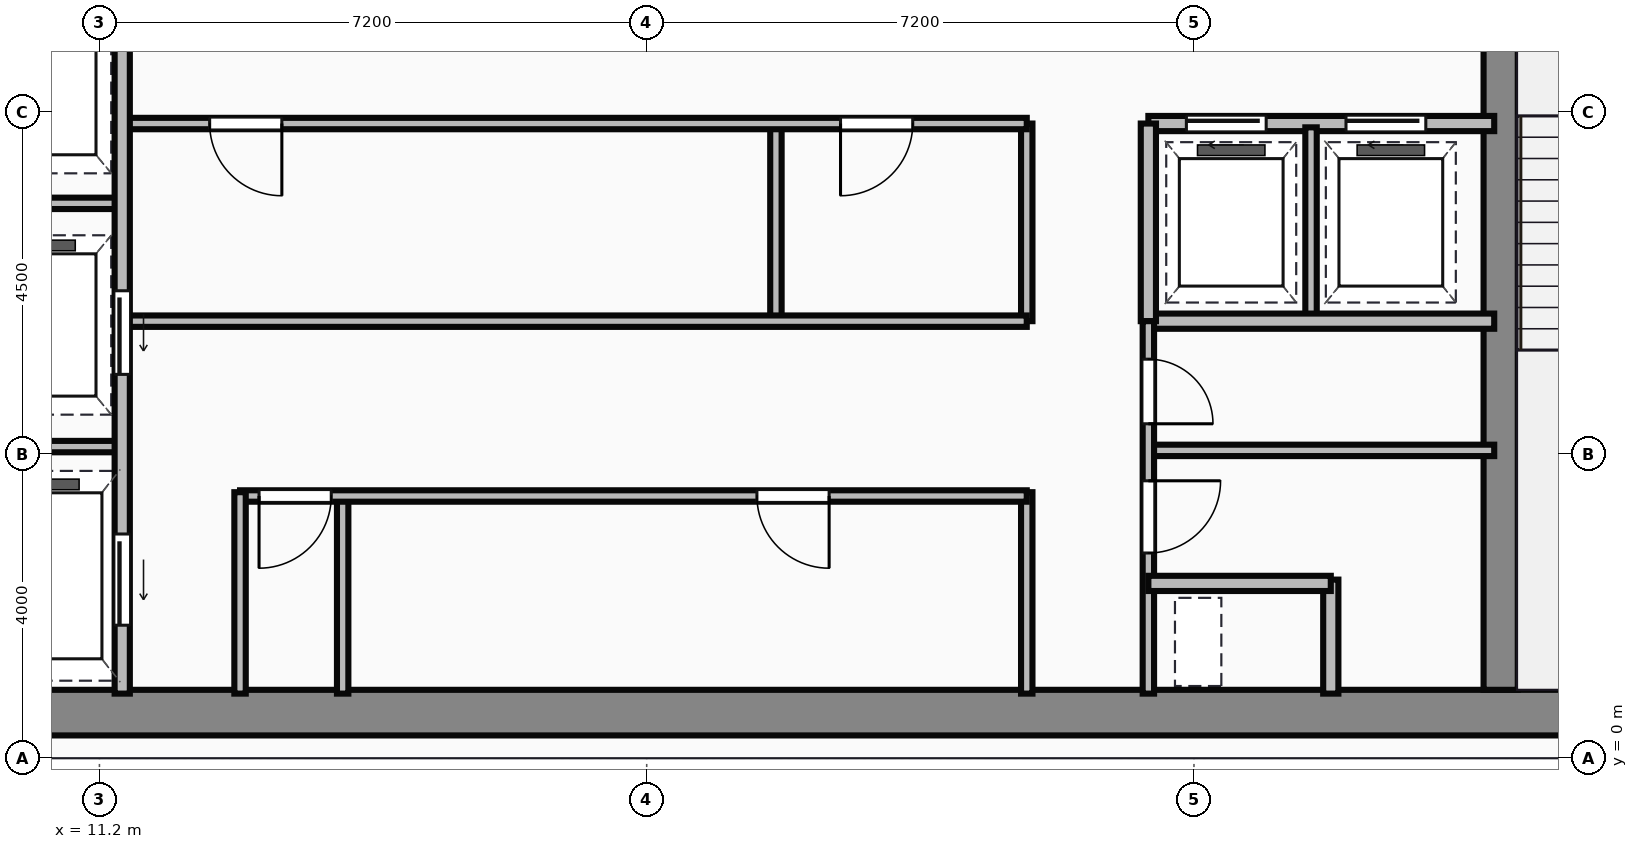
"""IFC4 building model, lengths in metres.
Left out: names, types, materials, properties, quantities, classifications, styles, units other than length and angle.
Written with IfcOpenShell. Run it as: python <this file> out.ifc"""

import sys

from ifc_helpers import new_model, si_unit, direction, frame, frame_2d, origin, place, context, subcontext, project, spatial, rectangle, extrude, source, transform, mapped, element, fill, save


model = new_model("IFC4")
c1 = context("Model", 3, precision=1e-05, world=origin(), true_north=direction((0.0, 1.0)))
c2 = subcontext(c1, "Body", "Model", "MODEL_VIEW")
j1 = project(units=[si_unit("LENGTHUNIT", "METRE"), si_unit("PLANEANGLEUNIT", "RADIAN")], contexts=[c1])
p1 = place(None, origin())
s1 = spatial("IfcSite", under=j1, at=p1, CompositionType="ELEMENT")
p2 = place(p1, origin())
s2 = spatial("IfcBuilding", under=s1, at=p2, CompositionType="ELEMENT")
p3 = place(p2, frame((0.0, 0.0, 288.0)))
s3 = spatial("IfcBuildingStorey", under=s2, at=p3, CompositionType="ELEMENT", Elevation=288.0)
m1 = source(origin(), c2, "Body", "SweptSolid", [
    extrude(rectangle(XDim=29.5, YDim=0.6, at=frame_2d((14.75, 0.0))), origin(), (0.0, 0.0, 1.0), 4.25),
])
p4 = place(p3, frame((4.5, 0.6, 0.0), z_axis=(0.0, 0.0, 1.0), x_axis=(1.0, 0.0, 0.0)))
e1 = element("IfcWall", 1, at=p4, inside=s3, PredefinedType="SHEAR", context=c2, shape_type="MappedRepresentation", body=[
    mapped(m1, transform((0.0, 0.0, 0.0))),
])
m2 = source(origin(), c2, "Body", "SweptSolid", [
    extrude(rectangle(XDim=12.5, YDim=0.45, at=frame_2d((6.25, 0.0))), origin(), (0.0, 0.0, 1.0), 4.25),
])
p5 = place(p3, frame((29.635, 0.9, 0.0), z_axis=(0.0, 0.0, 1.0), x_axis=(0.0, 1.0, 0.0)))
e2 = element("IfcWall", 2, at=p5, inside=s3, PredefinedType="SHEAR", context=c2, shape_type="MappedRepresentation", body=[
    mapped(m2, transform((0.0, 0.0, 0.0))),
])
m3 = source(origin(), c2, "Body", "SweptSolid", [
    extrude(rectangle(XDim=9.6, YDim=0.2, at=frame_2d((4.8, 0.0))), origin(), (0.0, 0.0, 1.0), 3.85),
])
p6 = place(p3, frame((11.5, 0.85, 0.0), z_axis=(0.0, 0.0, 1.0), x_axis=(0.0, 1.0, 0.0)))
e3 = element("IfcWall", 3, at=p6, inside=s3, PredefinedType="PARTITIONING", context=c2, shape_type="MappedRepresentation", body=[
    mapped(m3, transform((0.0, 0.0, 0.0))),
])
p7 = place(p6, frame((4.2, 0.0, 0.0)))
e4 = element("IfcOpeningElement", 4, at=p7, cuts=e3, PredefinedType="OPENING", context=c2, shape_type="SweptSolid", body=[
    extrude(rectangle(XDim=1.1, YDim=2.15, at=frame_2d((0.55, 1.075))), frame((0.0, 0.11, 0.0), z_axis=(0.0, -1.0, 0.0), x_axis=(1.0, 0.0, 0.0)), (0.0, 0.0, 1.0), 0.22),
])
p8 = place(p6, frame((0.9, 0.0, 0.0)))
e5 = element("IfcOpeningElement", 5, at=p8, cuts=e3, PredefinedType="OPENING", context=c2, shape_type="SweptSolid", body=[
    extrude(rectangle(XDim=1.2, YDim=2.15, at=frame_2d((0.6, 1.075))), frame((0.0, 0.11, 0.0), z_axis=(0.0, -1.0, 0.0), x_axis=(1.0, 0.0, 0.0)), (0.0, 0.0, 1.0), 0.22),
])
m4 = source(origin(), c2, "Body", "SweptSolid", [
    extrude(rectangle(XDim=2.4, YDim=0.15, at=frame_2d((1.2, 0.0))), origin(), (0.0, 0.0, 1.0), 3.85),
])
for number, where, z_axis, x_axis in (
    (6, (9.1, 4.1, 0.0), (0.0, 0.0, 1.0), (1.0, 0.0, 0.0)),
    (7, (9.1, 7.3, 0.0), (0.0, 0.0, 1.0), (1.0, 0.0, 0.0)),
):
    element("IfcWall", number, at=place(p3, frame(where, z_axis=z_axis, x_axis=x_axis)), inside=s3, PredefinedType="PARTITIONING", context=c2, shape_type="MappedRepresentation", body=[
        mapped(m4, transform((0.0, 0.0, 0.0))),
    ])
m5 = source(origin(), c2, "Body", "SweptSolid", [
    extrude(rectangle(XDim=2.65, YDim=0.15, at=frame_2d((1.325, 0.0))), origin(), (0.0, 0.0, 1.0), 3.85),
])
p9 = place(p3, frame((13.05, 0.85, 0.0), z_axis=(0.0, 0.0, 1.0), x_axis=(0.0, 1.0, 0.0)))
e8 = element("IfcWall", 8, at=p9, inside=s3, PredefinedType="PARTITIONING", context=c2, shape_type="MappedRepresentation", body=[
    mapped(m5, transform((0.0, 0.0, 0.0))),
])
m6 = source(origin(), c2, "Body", "SweptSolid", [
    extrude(rectangle(XDim=10.35, YDim=0.15, at=frame_2d((5.175, 0.0))), origin(), (0.0, 0.0, 1.0), 3.85),
])
p10 = place(p3, frame((13.05, 3.45, 0.0), z_axis=(0.0, 0.0, 1.0), x_axis=(1.0, 0.0, 0.0)))
e9 = element("IfcWall", 9, at=p10, inside=s3, PredefinedType="PARTITIONING", context=c2, shape_type="MappedRepresentation", body=[
    mapped(m6, transform((0.0, 0.0, 0.0))),
])
p11 = place(p10, frame((0.25, 0.0, 0.0)))
e10 = element("IfcOpeningElement", 10, at=p11, cuts=e9, PredefinedType="OPENING", context=c2, shape_type="SweptSolid", body=[
    extrude(rectangle(XDim=0.95, YDim=2.15, at=frame_2d((0.475, 1.075))), frame((0.0, 0.085, 0.0), z_axis=(0.0, -1.0, 0.0), x_axis=(1.0, 0.0, 0.0)), (0.0, 0.0, 1.0), 0.17),
])
p12 = place(p10, frame((6.8, 0.0, 0.0)))
e11 = element("IfcOpeningElement", 11, at=p12, cuts=e9, PredefinedType="OPENING", context=c2, shape_type="SweptSolid", body=[
    extrude(rectangle(XDim=0.95, YDim=2.15, at=frame_2d((0.475, 1.075))), frame((0.0, 0.085, 0.0), z_axis=(0.0, -1.0, 0.0), x_axis=(1.0, 0.0, 0.0)), (0.0, 0.0, 1.0), 0.17),
])
p13 = place(p3, frame((23.4, 0.85, 0.0), z_axis=(0.0, 0.0, 1.0), x_axis=(0.0, 1.0, 0.0)))
e12 = element("IfcWall", 12, at=p13, inside=s3, PredefinedType="PARTITIONING", context=c2, shape_type="MappedRepresentation", body=[
    mapped(m5, transform((0.0, 0.0, 0.0))),
])
m7 = source(origin(), c2, "Body", "SweptSolid", [
    extrude(rectangle(XDim=2.6, YDim=0.15, at=frame_2d((1.3, 0.0))), origin(), (0.0, 0.0, 1.0), 3.85),
])
p14 = place(p3, frame((14.4, 0.85, 0.0), z_axis=(0.0, 0.0, 1.0), x_axis=(0.0, 1.0, 0.0)))
e13 = element("IfcWall", 13, at=p14, inside=s3, PredefinedType="PARTITIONING", context=c2, shape_type="MappedRepresentation", body=[
    mapped(m7, transform((0.0, 0.0, 0.0))),
])
m8 = source(origin(), c2, "Body", "SweptSolid", [
    extrude(rectangle(XDim=11.85, YDim=0.15, at=frame_2d((5.925, 0.0))), origin(), (0.0, 0.0, 1.0), 3.85),
])
p15 = place(p3, frame((11.55, 5.75, 0.0), z_axis=(0.0, 0.0, 1.0), x_axis=(1.0, 0.0, 0.0)))
e14 = element("IfcWall", 14, at=p15, inside=s3, PredefinedType="PARTITIONING", context=c2, shape_type="MappedRepresentation", body=[
    mapped(m8, transform((0.0, 0.0, 0.0))),
])
p16 = place(p3, frame((11.55, 8.35, 0.0), z_axis=(0.0, 0.0, 1.0), x_axis=(1.0, 0.0, 0.0)))
e15 = element("IfcWall", 15, at=p16, inside=s3, PredefinedType="PARTITIONING", context=c2, shape_type="MappedRepresentation", body=[
    mapped(m8, transform((0.0, 0.0, 0.0))),
])
p17 = place(p16, frame((1.1, 0.0, 0.0)))
e16 = element("IfcOpeningElement", 16, at=p17, cuts=e15, PredefinedType="OPENING", context=c2, shape_type="SweptSolid", body=[
    extrude(rectangle(XDim=0.95, YDim=2.15, at=frame_2d((0.475, 1.075))), frame((0.0, 0.085, 0.0), z_axis=(0.0, -1.0, 0.0), x_axis=(1.0, 0.0, 0.0)), (0.0, 0.0, 1.0), 0.17),
])
p18 = place(p16, frame((9.4, 0.0, 0.0)))
e17 = element("IfcOpeningElement", 17, at=p18, cuts=e15, PredefinedType="OPENING", context=c2, shape_type="SweptSolid", body=[
    extrude(rectangle(XDim=0.95, YDim=2.15, at=frame_2d((0.475, 1.075))), frame((0.0, 0.085, 0.0), z_axis=(0.0, -1.0, 0.0), x_axis=(1.0, 0.0, 0.0)), (0.0, 0.0, 1.0), 0.17),
])
m9 = source(origin(), c2, "Body", "SweptSolid", [
    extrude(rectangle(XDim=2.6, YDim=0.15, at=frame_2d((1.3, 0.0))), origin(), (0.0, 0.0, 1.0), 3.85),
])
p19 = place(p3, frame((23.4, 5.75, 0.0), z_axis=(0.0, 0.0, 1.0), x_axis=(0.0, 1.0, 0.0)))
e18 = element("IfcWall", 18, at=p19, inside=s3, PredefinedType="PARTITIONING", context=c2, shape_type="MappedRepresentation", body=[
    mapped(m9, transform((0.0, 0.0, 0.0))),
])
m10 = source(origin(), c2, "Body", "SweptSolid", [
    extrude(rectangle(XDim=2.5, YDim=0.15, at=frame_2d((1.25, 0.0))), origin(), (0.0, 0.0, 1.0), 3.85),
])
p20 = place(p3, frame((20.1, 5.8, 0.0), z_axis=(0.0, 0.0, 1.0), x_axis=(0.0, 1.0, 0.0)))
e19 = element("IfcWall", 19, at=p20, inside=s3, PredefinedType="PARTITIONING", context=c2, shape_type="MappedRepresentation", body=[
    mapped(m10, transform((0.0, 0.0, 0.0))),
])
m11 = source(origin(), c2, "Body", "SweptSolid", [
    extrude(rectangle(XDim=4.55, YDim=0.2, at=frame_2d((2.275, 0.0))), origin(), (0.0, 0.0, 1.0), 3.85),
])
p21 = place(p3, frame((25.0, 8.35, 0.0), z_axis=(0.0, 0.0, 1.0), x_axis=(1.0, 0.0, 0.0)))
e20 = element("IfcWall", 20, at=p21, inside=s3, PredefinedType="PARTITIONING", context=c2, shape_type="MappedRepresentation", body=[
    mapped(m11, transform((0.0, 0.0, 0.0))),
])
p22 = place(p21, frame((0.5, 0.0, 0.0)))
e21 = element("IfcOpeningElement", 21, at=p22, cuts=e20, PredefinedType="OPENING", context=c2, shape_type="SweptSolid", body=[
    extrude(rectangle(XDim=1.05, YDim=2.15, at=frame_2d((0.525, 1.075))), frame((0.0, 0.11, 0.0), z_axis=(0.0, -1.0, 0.0), x_axis=(1.0, 0.0, 0.0)), (0.0, 0.0, 1.0), 0.22),
])
p23 = place(p21, frame((2.6, 0.0, 0.0)))
e22 = element("IfcOpeningElement", 22, at=p23, cuts=e20, PredefinedType="OPENING", context=c2, shape_type="SweptSolid", body=[
    extrude(rectangle(XDim=1.05, YDim=2.15, at=frame_2d((0.525, 1.075))), frame((0.0, 0.11, 0.0), z_axis=(0.0, -1.0, 0.0), x_axis=(1.0, 0.0, 0.0)), (0.0, 0.0, 1.0), 0.22),
])
p24 = place(p3, frame((25.0, 5.75, 0.0), z_axis=(0.0, 0.0, 1.0), x_axis=(1.0, 0.0, 0.0)))
e23 = element("IfcWall", 23, at=p24, inside=s3, PredefinedType="PARTITIONING", context=c2, shape_type="MappedRepresentation", body=[
    mapped(m11, transform((0.0, 0.0, 0.0))),
])
m12 = source(origin(), c2, "Body", "SweptSolid", [
    extrude(rectangle(XDim=2.6, YDim=0.2, at=frame_2d((1.3, 0.0))), origin(), (0.0, 0.0, 1.0), 3.85),
])
p25 = place(p3, frame((25.0, 5.75, 0.0), z_axis=(0.0, 0.0, 1.0), x_axis=(0.0, 1.0, 0.0)))
e24 = element("IfcWall", 24, at=p25, inside=s3, PredefinedType="PARTITIONING", context=c2, shape_type="MappedRepresentation", body=[
    mapped(m12, transform((0.0, 0.0, 0.0))),
])
p26 = place(p3, frame((27.14, 5.8, 0.0), z_axis=(0.0, 0.0, 1.0), x_axis=(0.0, 1.0, 0.0)))
e25 = element("IfcWall", 25, at=p26, inside=s3, PredefinedType="PARTITIONING", context=c2, shape_type="MappedRepresentation", body=[
    mapped(m10, transform((0.0, 0.0, 0.0))),
])
m13 = source(origin(), c2, "Body", "SweptSolid", [
    extrude(rectangle(XDim=4.9, YDim=0.15, at=frame_2d((2.45, 0.0))), origin(), (0.0, 0.0, 1.0), 3.85),
])
p27 = place(p3, frame((25.0, 0.85, 0.0), z_axis=(0.0, 0.0, 1.0), x_axis=(0.0, 1.0, 0.0)))
e26 = element("IfcWall", 26, at=p27, inside=s3, PredefinedType="PARTITIONING", context=c2, shape_type="MappedRepresentation", body=[
    mapped(m13, transform((0.0, 0.0, 0.0))),
])
p28 = place(p27, frame((1.85, 0.0, 0.0)))
e27 = element("IfcOpeningElement", 27, at=p28, cuts=e26, PredefinedType="OPENING", context=c2, shape_type="SweptSolid", body=[
    extrude(rectangle(XDim=0.95, YDim=2.15, at=frame_2d((0.475, 1.075))), frame((0.0, 0.085, 0.0), z_axis=(0.0, -1.0, 0.0), x_axis=(1.0, 0.0, 0.0)), (0.0, 0.0, 1.0), 0.17),
])
p29 = place(p27, frame((3.55, 0.0, 0.0)))
e28 = element("IfcOpeningElement", 28, at=p29, cuts=e26, PredefinedType="OPENING", context=c2, shape_type="SweptSolid", body=[
    extrude(rectangle(XDim=0.85, YDim=2.15, at=frame_2d((0.425, 1.075))), frame((0.0, 0.085, 0.0), z_axis=(0.0, -1.0, 0.0), x_axis=(1.0, 0.0, 0.0)), (0.0, 0.0, 1.0), 0.17),
])
m14 = source(origin(), c2, "Body", "SweptSolid", [
    extrude(rectangle(XDim=2.4, YDim=0.2, at=frame_2d((1.2, 0.0))), origin(), (0.0, 0.0, 1.0), 3.85),
])
p30 = place(p3, frame((25.0, 2.3, 0.0), z_axis=(0.0, 0.0, 1.0), x_axis=(1.0, 0.0, 0.0)))
e29 = element("IfcWall", 29, at=p30, inside=s3, PredefinedType="PARTITIONING", context=c2, shape_type="MappedRepresentation", body=[
    mapped(m14, transform((0.0, 0.0, 0.0))),
])
m15 = source(origin(), c2, "Body", "SweptSolid", [
    extrude(rectangle(XDim=1.5, YDim=0.2, at=frame_2d((0.75, 0.0))), origin(), (0.0, 0.0, 1.0), 3.85),
])
p31 = place(p3, frame((27.4, 0.85, 0.0), z_axis=(0.0, 0.0, 1.0), x_axis=(0.0, 1.0, 0.0)))
e30 = element("IfcWall", 30, at=p31, inside=s3, PredefinedType="PARTITIONING", context=c2, shape_type="MappedRepresentation", body=[
    mapped(m15, transform((0.0, 0.0, 0.0))),
])
m16 = source(origin(), c2, "Body", "SweptSolid", [
    extrude(rectangle(XDim=4.55, YDim=0.15, at=frame_2d((2.275, 0.0))), origin(), (0.0, 0.0, 1.0), 3.85),
])
p32 = place(p3, frame((25.0, 4.05, 0.0), z_axis=(0.0, 0.0, 1.0), x_axis=(1.0, 0.0, 0.0)))
e31 = element("IfcWall", 31, at=p32, inside=s3, PredefinedType="PARTITIONING", context=c2, shape_type="MappedRepresentation", body=[
    mapped(m16, transform((0.0, 0.0, 0.0))),
])
m17 = source(origin(), c2, "Body", "SweptSolid", [
    extrude(rectangle(XDim=1.1, YDim=2.15, at=frame_2d((0.55, 1.075))), frame((0.0, 0.025, 0.0), z_axis=(0.0, -1.0, 0.0), x_axis=(1.0, 0.0, 0.0)), (0.0, 0.0, 1.0), 0.05),
])
p33 = place(p7, frame((1.1, 0.0, 0.0), z_axis=(0.0, 0.0, 1.0), x_axis=(-1.0, 0.0, 0.0)))
e32 = element("IfcDoor", 32, at=p33, inside=s3, OperationType="SLIDING_TO_LEFT", PredefinedType="DOOR", context=c2, shape_type="MappedRepresentation", body=[
    mapped(m17, transform((0.0, 0.0, 0.0))),
])
fill(e4, e32)
m18 = source(origin(), c2, "Body", "SweptSolid", [
    extrude(rectangle(XDim=1.2, YDim=2.15, at=frame_2d((0.6, 1.075))), frame((0.0, 0.025, 0.0), z_axis=(0.0, -1.0, 0.0), x_axis=(1.0, 0.0, 0.0)), (0.0, 0.0, 1.0), 0.05),
])
p34 = place(p8, frame((1.2, 0.0, 0.0), z_axis=(0.0, 0.0, 1.0), x_axis=(-1.0, 0.0, 0.0)))
e33 = element("IfcDoor", 33, at=p34, inside=s3, OperationType="SLIDING_TO_LEFT", PredefinedType="DOOR", context=c2, shape_type="MappedRepresentation", body=[
    mapped(m18, transform((0.0, 0.0, 0.0))),
])
fill(e5, e33)
m19 = source(origin(), c2, "Body", "SweptSolid", [
    extrude(rectangle(XDim=0.95, YDim=2.15, at=frame_2d((0.475, 1.075))), frame((0.0, 0.025, 0.0), z_axis=(0.0, -1.0, 0.0), x_axis=(1.0, 0.0, 0.0)), (0.0, 0.0, 1.0), 0.05),
])
p35 = place(p11, origin())
e34 = element("IfcDoor", 34, at=p35, inside=s3, OperationType="SINGLE_SWING_LEFT", PredefinedType="DOOR", context=c2, shape_type="MappedRepresentation", body=[
    mapped(m19, transform((0.0, 0.0, 0.0))),
])
fill(e10, e34)
p36 = place(p12, origin())
e35 = element("IfcDoor", 35, at=p36, inside=s3, OperationType="SINGLE_SWING_RIGHT", PredefinedType="DOOR", context=c2, shape_type="MappedRepresentation", body=[
    mapped(m19, transform((0.0, 0.0, 0.0))),
])
fill(e11, e35)
p37 = place(p17, origin())
e36 = element("IfcDoor", 36, at=p37, inside=s3, OperationType="SINGLE_SWING_RIGHT", PredefinedType="DOOR", context=c2, shape_type="MappedRepresentation", body=[
    mapped(m19, transform((0.0, 0.0, 0.0))),
])
fill(e16, e36)
p38 = place(p18, origin())
e37 = element("IfcDoor", 37, at=p38, inside=s3, OperationType="SINGLE_SWING_LEFT", PredefinedType="DOOR", context=c2, shape_type="MappedRepresentation", body=[
    mapped(m19, transform((0.0, 0.0, 0.0))),
])
fill(e17, e37)
m20 = source(origin(), c2, "Body", "SweptSolid", [
    extrude(rectangle(XDim=1.05, YDim=2.15, at=frame_2d((0.525, 1.075))), frame((0.0, 0.025, 0.0), z_axis=(0.0, -1.0, 0.0), x_axis=(1.0, 0.0, 0.0)), (0.0, 0.0, 1.0), 0.05),
])
p39 = place(p22, origin())
e38 = element("IfcDoor", 38, at=p39, inside=s3, OperationType="SLIDING_TO_LEFT", PredefinedType="DOOR", context=c2, shape_type="MappedRepresentation", body=[
    mapped(m20, transform((0.0, 0.0, 0.0))),
])
fill(e21, e38)
p40 = place(p23, origin())
e39 = element("IfcDoor", 39, at=p40, inside=s3, OperationType="SLIDING_TO_LEFT", PredefinedType="DOOR", context=c2, shape_type="MappedRepresentation", body=[
    mapped(m20, transform((0.0, 0.0, 0.0))),
])
fill(e22, e39)
p41 = place(p28, origin())
e40 = element("IfcDoor", 40, at=p41, inside=s3, OperationType="SINGLE_SWING_RIGHT", PredefinedType="DOOR", context=c2, shape_type="MappedRepresentation", body=[
    mapped(m19, transform((0.0, 0.0, 0.0))),
])
fill(e27, e40)
m21 = source(origin(), c2, "Body", "SweptSolid", [
    extrude(rectangle(XDim=0.85, YDim=2.15, at=frame_2d((0.425, 1.075))), frame((0.0, 0.025, 0.0), z_axis=(0.0, -1.0, 0.0), x_axis=(1.0, 0.0, 0.0)), (0.0, 0.0, 1.0), 0.05),
])
p42 = place(p29, origin())
e41 = element("IfcDoor", 41, at=p42, inside=s3, OperationType="SINGLE_SWING_LEFT", PredefinedType="DOOR", context=c2, shape_type="MappedRepresentation", body=[
    mapped(m21, transform((0.0, 0.0, 0.0))),
])
fill(e28, e41)
save(model, sys.argv[1])
